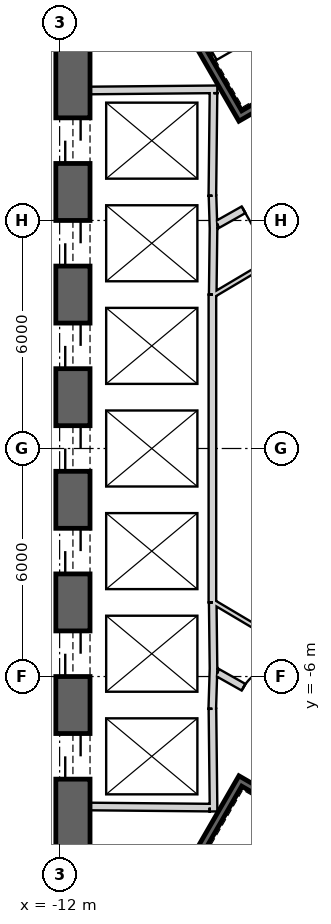
"""IFC4 building model, lengths in metres.
Left out: names, types, materials, properties, quantities, classifications, styles, units other than length and angle.
Written with IfcOpenShell. Run it as: python <this file> out.ifc"""

import sys

from ifc_helpers import new_model, si_unit, direction, frame, frame_2d, origin, place, context, subcontext, project, spatial, rectangle, extrude, element, fill, save


model = new_model("IFC4")
c1 = context("Model", 3, precision=1e-05, world=origin(), true_north=direction((0.0, 1.0)))
c2 = subcontext(c1, "Body", "Model", "MODEL_VIEW")
j1 = project(units=[si_unit("LENGTHUNIT", "METRE"), si_unit("PLANEANGLEUNIT", "RADIAN")], contexts=[c1])
p1 = place(None, origin())
s1 = spatial("IfcSite", under=j1, at=p1, CompositionType="ELEMENT")
p2 = place(p1, origin())
s2 = spatial("IfcBuilding", under=s1, at=p2, CompositionType="ELEMENT")
p3 = place(p2, frame((0.0, 0.0, 253.2)))
s3 = spatial("IfcBuildingStorey", under=s2, at=p3, CompositionType="ELEMENT", Elevation=253.2)
p4 = place(p3, frame((19.475, 2.208, 0.0), z_axis=(0.0, 0.0, 1.0), x_axis=(-0.866028369851, 0.499994862586, 0.0)))
e1 = element("IfcWall", 1, at=p4, inside=s3, PredefinedType="SHEAR", context=c2, shape_type="SweptSolid", body=[
    extrude(rectangle(XDim=31.523, YDim=0.9, at=frame_2d((15.762, 0.0))), origin(), (0.0, 0.0, 1.0), 4.0),
])
p5 = place(p4, frame((7.062, 0.0, 0.0)))
e2 = element("IfcOpeningElement", 2, at=p5, cuts=e1, PredefinedType="OPENING", context=c2, shape_type="SweptSolid", body=[
    extrude(rectangle(XDim=1.2, YDim=2.4, at=frame_2d((0.6, 1.2))), frame((0.0, 0.46, 0.0), z_axis=(0.0, -1.0, 0.0), x_axis=(1.0, 0.0, 0.0)), (0.0, 0.0, 1.0), 0.92),
])
p6 = place(p4, frame((3.612, 0.0, 0.0)))
e3 = element("IfcOpeningElement", 3, at=p6, cuts=e1, PredefinedType="OPENING", context=c2, shape_type="SweptSolid", body=[
    extrude(rectangle(XDim=1.2, YDim=2.4, at=frame_2d((0.6, 1.2))), frame((0.0, 0.46, 0.0), z_axis=(0.0, -1.0, 0.0), x_axis=(1.0, 0.0, 0.0)), (0.0, 0.0, 1.0), 0.92),
])
p7 = place(p4, frame((26.712, 0.0, 0.0)))
e4 = element("IfcOpeningElement", 4, at=p7, cuts=e1, PredefinedType="OPENING", context=c2, shape_type="SweptSolid", body=[
    extrude(rectangle(XDim=1.2, YDim=2.4, at=frame_2d((0.6, 1.2))), frame((0.0, 0.46, 0.0), z_axis=(0.0, -1.0, 0.0), x_axis=(1.0, 0.0, 0.0)), (0.0, 0.0, 1.0), 0.92),
])
p8 = place(p3, frame((-11.65, 15.762, 0.0), z_axis=(0.0, 0.0, 1.0), x_axis=(0.0, -1.0, 0.0)))
e5 = element("IfcWall", 5, at=p8, inside=s3, PredefinedType="SHEAR", context=c2, shape_type="SweptSolid", body=[
    extrude(rectangle(XDim=31.523, YDim=0.9, at=frame_2d((15.762, 0.0))), origin(), (0.0, 0.0, 1.0), 4.0),
])
p9 = place(p8, frame((7.062, 0.0, 0.0)))
e6 = element("IfcOpeningElement", 6, at=p9, cuts=e5, PredefinedType="OPENING", context=c2, shape_type="SweptSolid", body=[
    extrude(rectangle(XDim=1.2, YDim=2.4, at=frame_2d((0.6, 1.2))), frame((0.0, 0.46, 0.0), z_axis=(0.0, -1.0, 0.0), x_axis=(1.0, 0.0, 0.0)), (0.0, 0.0, 1.0), 0.92),
])
p10 = place(p8, frame((9.762, 0.0, 0.0)))
e7 = element("IfcOpeningElement", 7, at=p10, cuts=e5, PredefinedType="OPENING", context=c2, shape_type="SweptSolid", body=[
    extrude(rectangle(XDim=1.2, YDim=2.4, at=frame_2d((0.6, 1.2))), frame((0.0, 0.46, 0.0), z_axis=(0.0, -1.0, 0.0), x_axis=(1.0, 0.0, 0.0)), (0.0, 0.0, 1.0), 0.92),
])
p11 = place(p8, frame((12.462, 0.0, 0.0)))
e8 = element("IfcOpeningElement", 8, at=p11, cuts=e5, PredefinedType="OPENING", context=c2, shape_type="SweptSolid", body=[
    extrude(rectangle(XDim=1.2, YDim=2.4, at=frame_2d((0.6, 1.2))), frame((0.0, 0.46, 0.0), z_axis=(0.0, -1.0, 0.0), x_axis=(1.0, 0.0, 0.0)), (0.0, 0.0, 1.0), 0.92),
])
p12 = place(p8, frame((15.162, 0.0, 0.0)))
e9 = element("IfcOpeningElement", 9, at=p12, cuts=e5, PredefinedType="OPENING", context=c2, shape_type="SweptSolid", body=[
    extrude(rectangle(XDim=1.2, YDim=2.4, at=frame_2d((0.6, 1.2))), frame((0.0, 0.46, 0.0), z_axis=(0.0, -1.0, 0.0), x_axis=(1.0, 0.0, 0.0)), (0.0, 0.0, 1.0), 0.92),
])
p13 = place(p8, frame((17.862, 0.0, 0.0)))
e10 = element("IfcOpeningElement", 10, at=p13, cuts=e5, PredefinedType="OPENING", context=c2, shape_type="SweptSolid", body=[
    extrude(rectangle(XDim=1.2, YDim=2.4, at=frame_2d((0.6, 1.2))), frame((0.0, 0.46, 0.0), z_axis=(0.0, -1.0, 0.0), x_axis=(1.0, 0.0, 0.0)), (0.0, 0.0, 1.0), 0.92),
])
p14 = place(p8, frame((20.562, 0.0, 0.0)))
e11 = element("IfcOpeningElement", 11, at=p14, cuts=e5, PredefinedType="OPENING", context=c2, shape_type="SweptSolid", body=[
    extrude(rectangle(XDim=1.2, YDim=2.4, at=frame_2d((0.6, 1.2))), frame((0.0, 0.46, 0.0), z_axis=(0.0, -1.0, 0.0), x_axis=(1.0, 0.0, 0.0)), (0.0, 0.0, 1.0), 0.92),
])
p15 = place(p8, frame((23.262, 0.0, 0.0)))
e12 = element("IfcOpeningElement", 12, at=p15, cuts=e5, PredefinedType="OPENING", context=c2, shape_type="SweptSolid", body=[
    extrude(rectangle(XDim=1.2, YDim=2.4, at=frame_2d((0.6, 1.2))), frame((0.0, 0.46, 0.0), z_axis=(0.0, -1.0, 0.0), x_axis=(1.0, 0.0, 0.0)), (0.0, 0.0, 1.0), 0.92),
])
p16 = place(p8, frame((3.612, 0.0, 0.0)))
e13 = element("IfcOpeningElement", 13, at=p16, cuts=e5, PredefinedType="OPENING", context=c2, shape_type="SweptSolid", body=[
    extrude(rectangle(XDim=1.2, YDim=2.4, at=frame_2d((0.6, 1.2))), frame((0.0, 0.46, 0.0), z_axis=(0.0, -1.0, 0.0), x_axis=(1.0, 0.0, 0.0)), (0.0, 0.0, 1.0), 0.92),
])
p17 = place(p8, frame((26.712, 0.0, 0.0)))
e14 = element("IfcOpeningElement", 14, at=p17, cuts=e5, PredefinedType="OPENING", context=c2, shape_type="SweptSolid", body=[
    extrude(rectangle(XDim=1.2, YDim=2.4, at=frame_2d((0.6, 1.2))), frame((0.0, 0.46, 0.0), z_axis=(0.0, -1.0, 0.0), x_axis=(1.0, 0.0, 0.0)), (0.0, 0.0, 1.0), 0.92),
])
p18 = place(p3, frame((-7.825, -17.97, 0.0), z_axis=(0.0, 0.0, 1.0), x_axis=(0.866028369851, 0.499994862586, 0.0)))
e15 = element("IfcWall", 15, at=p18, inside=s3, PredefinedType="SHEAR", context=c2, shape_type="SweptSolid", body=[
    extrude(rectangle(XDim=31.523, YDim=0.9, at=frame_2d((15.762, 0.0))), origin(), (0.0, 0.0, 1.0), 4.0),
])
p19 = place(p18, frame((7.062, 0.0, 0.0)))
e16 = element("IfcOpeningElement", 16, at=p19, cuts=e15, PredefinedType="OPENING", context=c2, shape_type="SweptSolid", body=[
    extrude(rectangle(XDim=1.2, YDim=2.4, at=frame_2d((0.6, 1.2))), frame((0.0, 0.46, 0.0), z_axis=(0.0, -1.0, 0.0), x_axis=(1.0, 0.0, 0.0)), (0.0, 0.0, 1.0), 0.92),
])
p20 = place(p18, frame((9.762, 0.0, 0.0)))
e17 = element("IfcOpeningElement", 17, at=p20, cuts=e15, PredefinedType="OPENING", context=c2, shape_type="SweptSolid", body=[
    extrude(rectangle(XDim=1.2, YDim=2.4, at=frame_2d((0.6, 1.2))), frame((0.0, 0.46, 0.0), z_axis=(0.0, -1.0, 0.0), x_axis=(1.0, 0.0, 0.0)), (0.0, 0.0, 1.0), 0.92),
])
p21 = place(p18, frame((12.462, 0.0, 0.0)))
e18 = element("IfcOpeningElement", 18, at=p21, cuts=e15, PredefinedType="OPENING", context=c2, shape_type="SweptSolid", body=[
    extrude(rectangle(XDim=1.2, YDim=2.4, at=frame_2d((0.6, 1.2))), frame((0.0, 0.46, 0.0), z_axis=(0.0, -1.0, 0.0), x_axis=(1.0, 0.0, 0.0)), (0.0, 0.0, 1.0), 0.92),
])
p22 = place(p18, frame((15.162, 0.0, 0.0)))
e19 = element("IfcOpeningElement", 19, at=p22, cuts=e15, PredefinedType="OPENING", context=c2, shape_type="SweptSolid", body=[
    extrude(rectangle(XDim=1.2, YDim=2.4, at=frame_2d((0.6, 1.2))), frame((0.0, 0.46, 0.0), z_axis=(0.0, -1.0, 0.0), x_axis=(1.0, 0.0, 0.0)), (0.0, 0.0, 1.0), 0.92),
])
p23 = place(p18, frame((17.862, 0.0, 0.0)))
e20 = element("IfcOpeningElement", 20, at=p23, cuts=e15, PredefinedType="OPENING", context=c2, shape_type="SweptSolid", body=[
    extrude(rectangle(XDim=1.2, YDim=2.4, at=frame_2d((0.6, 1.2))), frame((0.0, 0.46, 0.0), z_axis=(0.0, -1.0, 0.0), x_axis=(1.0, 0.0, 0.0)), (0.0, 0.0, 1.0), 0.92),
])
p24 = place(p18, frame((20.562, 0.0, 0.0)))
e21 = element("IfcOpeningElement", 21, at=p24, cuts=e15, PredefinedType="OPENING", context=c2, shape_type="SweptSolid", body=[
    extrude(rectangle(XDim=1.2, YDim=2.4, at=frame_2d((0.6, 1.2))), frame((0.0, 0.46, 0.0), z_axis=(0.0, -1.0, 0.0), x_axis=(1.0, 0.0, 0.0)), (0.0, 0.0, 1.0), 0.92),
])
p25 = place(p18, frame((26.712, 0.0, 0.0)))
e22 = element("IfcOpeningElement", 22, at=p25, cuts=e15, PredefinedType="OPENING", context=c2, shape_type="SweptSolid", body=[
    extrude(rectangle(XDim=1.2, YDim=2.4, at=frame_2d((0.6, 1.2))), frame((0.0, 0.46, 0.0), z_axis=(0.0, -1.0, 0.0), x_axis=(1.0, 0.0, 0.0)), (0.0, 0.0, 1.0), 0.92),
])
p26 = place(p18, frame((3.612, 0.0, 0.0)))
e23 = element("IfcOpeningElement", 23, at=p26, cuts=e15, PredefinedType="OPENING", context=c2, shape_type="SweptSolid", body=[
    extrude(rectangle(XDim=1.2, YDim=2.4, at=frame_2d((0.6, 1.2))), frame((0.0, 0.46, 0.0), z_axis=(0.0, -1.0, 0.0), x_axis=(1.0, 0.0, 0.0)), (0.0, 0.0, 1.0), 0.92),
])
p27 = place(p3, frame((-11.2, 9.42, 0.0), z_axis=(0.0, 0.0, 1.0), x_axis=(0.999957167047, 0.009255488683, 0.0)))
e24 = element("IfcWall", 24, at=p27, inside=s3, PredefinedType="PLUMBINGWALL", context=c2, shape_type="SweptSolid", body=[
    extrude(rectangle(XDim=3.35, YDim=0.2, at=frame_2d((1.675, 0.0))), origin(), (0.0, 0.0, 1.0), 3.7),
])
p28 = place(p3, frame((-7.951, 9.35, 0.0), z_axis=(0.0, 0.0, 1.0), x_axis=(-0.011120469654, -0.999938165666, 0.0)))
e25 = element("IfcWall", 25, at=p28, inside=s3, PredefinedType="PLUMBINGWALL", context=c2, shape_type="SweptSolid", body=[
    extrude(rectangle(XDim=2.7, YDim=0.2, at=frame_2d((1.35, 0.0))), origin(), (0.0, 0.0, 1.0), 3.7),
])
p29 = place(p3, frame((-7.977, 6.65, 0.0), z_axis=(0.0, 0.0, 1.0), x_axis=(0.030861509705, -0.999523670164, 0.0)))
e26 = element("IfcWall", 26, at=p29, inside=s3, PredefinedType="PLUMBINGWALL", context=c2, shape_type="SweptSolid", body=[
    extrude(rectangle(XDim=0.878, YDim=0.2, at=frame_2d((0.439, 0.0))), origin(), (0.0, 0.0, 1.0), 3.7),
])
p30 = place(p3, frame((-7.949, 5.895, 0.0), z_axis=(0.0, 0.0, 1.0), x_axis=(-0.012042535896, -0.999927486035, 0.0)))
e27 = element("IfcWall", 27, at=p30, inside=s3, PredefinedType="PLUMBINGWALL", context=c2, shape_type="SweptSolid", body=[
    extrude(rectangle(XDim=1.845, YDim=0.2, at=frame_2d((0.922, 0.0))), origin(), (0.0, 0.0, 1.0), 3.7),
])
p31 = place(p3, frame((-7.98, 4.05, 0.0), z_axis=(0.0, 0.0, 1.0), x_axis=(0.0, -1.0, 0.0)))
e28 = element("IfcWall", 28, at=p31, inside=s3, PredefinedType="PLUMBINGWALL", context=c2, shape_type="SweptSolid", body=[
    extrude(rectangle(XDim=8.1, YDim=0.2, at=frame_2d((4.05, 0.0))), origin(), (0.0, 0.0, 1.0), 3.7),
])
p32 = place(p3, frame((-7.95, -5.772, 0.0), z_axis=(0.0, 0.0, 1.0), x_axis=(-0.030803413295, -0.999525462272, 0.0)))
e29 = element("IfcWall", 29, at=p32, inside=s3, PredefinedType="PLUMBINGWALL", context=c2, shape_type="SweptSolid", body=[
    extrude(rectangle(XDim=1.078, YDim=0.2, at=frame_2d((0.539, 0.0))), origin(), (0.0, 0.0, 1.0), 3.7),
])
p33 = place(p3, frame((-7.971, -4.05, 0.0), z_axis=(0.0, 0.0, 1.0), x_axis=(0.012042535896, -0.999927486035, 0.0)))
e30 = element("IfcWall", 30, at=p33, inside=s3, PredefinedType="PLUMBINGWALL", context=c2, shape_type="SweptSolid", body=[
    extrude(rectangle(XDim=1.845, YDim=0.2, at=frame_2d((0.922, 0.0))), origin(), (0.0, 0.0, 1.0), 3.7),
])
p34 = place(p3, frame((-7.979, -6.85, 0.0), z_axis=(0.0, 0.0, 1.0), x_axis=(0.011121475088, -0.999938154483, 0.0)))
e31 = element("IfcWall", 31, at=p34, inside=s3, PredefinedType="PLUMBINGWALL", context=c2, shape_type="SweptSolid", body=[
    extrude(rectangle(XDim=2.7, YDim=0.2, at=frame_2d((1.35, 0.0))), origin(), (0.0, 0.0, 1.0), 3.7),
])
p35 = place(p3, frame((-8.05, -9.449, 0.0), z_axis=(0.0, 0.0, 1.0), x_axis=(-0.999957467379, 0.009222983926, 0.0)))
e32 = element("IfcWall", 32, at=p35, inside=s3, PredefinedType="PLUMBINGWALL", context=c2, shape_type="SweptSolid", body=[
    extrude(rectangle(XDim=3.15, YDim=0.2, at=frame_2d((1.575, 0.0))), origin(), (0.0, 0.0, 1.0), 3.7),
])
p36 = place(p3, frame((-11.245, 15.678, -0.3), z_axis=(0.0, 0.0, 1.0), x_axis=(0.499977274689, -0.866038523851, 0.0)))
e33 = element("IfcWall", 33, at=p36, inside=s3, PredefinedType="SHEAR", context=c2, shape_type="SweptSolid", body=[
    extrude(rectangle(XDim=8.1, YDim=0.2, at=frame_2d((4.05, 0.0))), origin(), (0.0, 0.0, 1.0), 4.0),
])
p37 = place(p3, frame((-7.159, 8.8, -0.3), z_axis=(0.0, 0.0, 1.0), x_axis=(0.866047807691, 0.499961193289, 0.0)))
e34 = element("IfcWall", 34, at=p37, inside=s3, PredefinedType="SHEAR", context=c2, shape_type="SweptSolid", body=[
    extrude(rectangle(XDim=3.6, YDim=0.2, at=frame_2d((1.8, 0.0))), origin(), (0.0, 0.0, 1.0), 4.0),
])
p38 = place(p37, frame((1.25, 0.0, 0.3)))
e35 = element("IfcOpeningElement", 35, at=p38, cuts=e34, PredefinedType="OPENING", context=c2, shape_type="SweptSolid", body=[
    extrude(rectangle(XDim=1.1, YDim=2.1, at=frame_2d((0.55, 1.05))), frame((0.0, 0.11, 0.0), z_axis=(0.0, -1.0, 0.0), x_axis=(1.0, 0.0, 0.0)), (0.0, 0.0, 1.0), 0.22),
])
p39 = place(p3, frame((-7.196, -8.663, -0.3), z_axis=(0.0, 0.0, 1.0), x_axis=(-0.499997992926, -0.866026562566, 0.0)))
e36 = element("IfcWall", 36, at=p39, inside=s3, PredefinedType="SHEAR", context=c2, shape_type="SweptSolid", body=[
    extrude(rectangle(XDim=7.9, YDim=0.2, at=frame_2d((3.95, 0.0))), origin(), (0.0, 0.0, 1.0), 4.0),
])
p40 = place(p3, frame((-4.041, -10.599, -0.3), z_axis=(0.0, 0.0, 1.0), x_axis=(-0.866047807691, 0.499961193289, 0.0)))
e37 = element("IfcWall", 37, at=p40, inside=s3, PredefinedType="SHEAR", context=c2, shape_type="SweptSolid", body=[
    extrude(rectangle(XDim=3.6, YDim=0.2, at=frame_2d((1.8, 0.0))), origin(), (0.0, 0.0, 1.0), 4.0),
])
p41 = place(p40, frame((1.25, 0.0, 0.3)))
e38 = element("IfcOpeningElement", 38, at=p41, cuts=e37, PredefinedType="OPENING", context=c2, shape_type="SweptSolid", body=[
    extrude(rectangle(XDim=1.1, YDim=2.1, at=frame_2d((0.55, 1.05))), frame((0.0, 0.11, 0.0), z_axis=(0.0, -1.0, 0.0), x_axis=(1.0, 0.0, 0.0)), (0.0, 0.0, 1.0), 0.22),
])
p42 = place(p3, frame((-5.6, 7.16, 0.0), z_axis=(0.0, 0.0, 1.0), x_axis=(-0.871363259478, -0.490638431059, 0.0)))
e39 = element("IfcWall", 39, at=p42, inside=s3, PredefinedType="PARTITIONING", context=c2, shape_type="SweptSolid", body=[
    extrude(rectangle(XDim=2.581, YDim=0.2, at=frame_2d((1.291, 0.0))), origin(), (0.0, 0.0, 1.0), 3.7),
])
p43 = place(p42, frame((0.791, 0.0, 0.0)))
e40 = element("IfcOpeningElement", 40, at=p43, cuts=e39, PredefinedType="OPENING", context=c2, shape_type="SweptSolid", body=[
    extrude(rectangle(XDim=1.0, YDim=2.1, at=frame_2d((0.5, 1.05))), frame((0.0, 0.11, 0.0), z_axis=(0.0, -1.0, 0.0), x_axis=(1.0, 0.0, 0.0)), (0.0, 0.0, 1.0), 0.22),
])
p44 = place(p3, frame((-7.849, -5.894, 0.0), z_axis=(0.0, 0.0, 1.0), x_axis=(0.871363259478, -0.490638431059, 0.0)))
e41 = element("IfcWall", 41, at=p44, inside=s3, PredefinedType="PARTITIONING", context=c2, shape_type="SweptSolid", body=[
    extrude(rectangle(XDim=2.581, YDim=0.2, at=frame_2d((1.291, 0.0))), origin(), (0.0, 0.0, 1.0), 3.7),
])
p45 = place(p44, frame((0.791, 0.0, 0.0)))
e42 = element("IfcOpeningElement", 42, at=p45, cuts=e41, PredefinedType="OPENING", context=c2, shape_type="SweptSolid", body=[
    extrude(rectangle(XDim=1.0, YDim=2.1, at=frame_2d((0.5, 1.05))), frame((0.0, 0.11, 0.0), z_axis=(0.0, -1.0, 0.0), x_axis=(1.0, 0.0, 0.0)), (0.0, 0.0, 1.0), 0.22),
])
p46 = place(p3, frame((-6.037, 5.176, 0.0), z_axis=(0.0, 0.0, 1.0), x_axis=(-0.860106072674, -0.510115225953, 0.0)))
e43 = element("IfcWall", 43, at=p46, inside=s3, PredefinedType="PARTITIONING", context=c2, shape_type="SweptSolid", body=[
    extrude(rectangle(XDim=2.225, YDim=0.12, at=frame_2d((1.112, 0.0))), origin(), (0.0, 0.0, 1.0), 3.7),
])
p47 = place(p3, frame((-7.95, -4.041, 0.0), z_axis=(0.0, 0.0, 1.0), x_axis=(0.860112457103, -0.510104461004, 0.0)))
e44 = element("IfcWall", 44, at=p47, inside=s3, PredefinedType="PARTITIONING", context=c2, shape_type="SweptSolid", body=[
    extrude(rectangle(XDim=2.104, YDim=0.12, at=frame_2d((1.052, 0.0))), origin(), (0.0, 0.0, 1.0), 3.7),
])
p48 = place(p43, origin())
e45 = element("IfcDoor", 45, at=p48, inside=s3, OperationType="SINGLE_SWING_RIGHT", PredefinedType="USERDEFINED", context=c2, shape_type="SweptSolid", body=[
    extrude(rectangle(XDim=1.0, YDim=2.1, at=frame_2d((0.5, 1.05))), frame((0.0, 0.025, 0.0), z_axis=(0.0, -1.0, 0.0), x_axis=(1.0, 0.0, 0.0)), (0.0, 0.0, 1.0), 0.05),
])
fill(e40, e45)
p49 = place(p45, origin())
e46 = element("IfcDoor", 46, at=p49, inside=s3, OperationType="SINGLE_SWING_RIGHT", PredefinedType="USERDEFINED", context=c2, shape_type="SweptSolid", body=[
    extrude(rectangle(XDim=1.0, YDim=2.1, at=frame_2d((0.5, 1.05))), frame((0.0, 0.025, 0.0), z_axis=(0.0, -1.0, 0.0), x_axis=(1.0, 0.0, 0.0)), (0.0, 0.0, 1.0), 0.05),
])
fill(e42, e46)
p50 = place(p9, origin())
e47 = element("IfcDoor", 47, at=p50, inside=s3, OperationType="SLIDING_TO_LEFT", PredefinedType="USERDEFINED", context=c2, shape_type="SweptSolid", body=[
    extrude(rectangle(XDim=1.2, YDim=2.4, at=frame_2d((0.6, 1.2))), frame((0.0, 0.025, 0.0), z_axis=(0.0, -1.0, 0.0), x_axis=(1.0, 0.0, 0.0)), (0.0, 0.0, 1.0), 0.05),
])
fill(e6, e47)
p51 = place(p10, origin())
e48 = element("IfcDoor", 48, at=p51, inside=s3, OperationType="SLIDING_TO_LEFT", PredefinedType="USERDEFINED", context=c2, shape_type="SweptSolid", body=[
    extrude(rectangle(XDim=1.2, YDim=2.4, at=frame_2d((0.6, 1.2))), frame((0.0, 0.025, 0.0), z_axis=(0.0, -1.0, 0.0), x_axis=(1.0, 0.0, 0.0)), (0.0, 0.0, 1.0), 0.05),
])
fill(e7, e48)
p52 = place(p11, origin())
e49 = element("IfcDoor", 49, at=p52, inside=s3, OperationType="SLIDING_TO_LEFT", PredefinedType="USERDEFINED", context=c2, shape_type="SweptSolid", body=[
    extrude(rectangle(XDim=1.2, YDim=2.4, at=frame_2d((0.6, 1.2))), frame((0.0, 0.025, 0.0), z_axis=(0.0, -1.0, 0.0), x_axis=(1.0, 0.0, 0.0)), (0.0, 0.0, 1.0), 0.05),
])
fill(e8, e49)
p53 = place(p12, origin())
e50 = element("IfcDoor", 50, at=p53, inside=s3, OperationType="SLIDING_TO_LEFT", PredefinedType="USERDEFINED", context=c2, shape_type="SweptSolid", body=[
    extrude(rectangle(XDim=1.2, YDim=2.4, at=frame_2d((0.6, 1.2))), frame((0.0, 0.025, 0.0), z_axis=(0.0, -1.0, 0.0), x_axis=(1.0, 0.0, 0.0)), (0.0, 0.0, 1.0), 0.05),
])
fill(e9, e50)
p54 = place(p13, origin())
e51 = element("IfcDoor", 51, at=p54, inside=s3, OperationType="SLIDING_TO_LEFT", PredefinedType="USERDEFINED", context=c2, shape_type="SweptSolid", body=[
    extrude(rectangle(XDim=1.2, YDim=2.4, at=frame_2d((0.6, 1.2))), frame((0.0, 0.025, 0.0), z_axis=(0.0, -1.0, 0.0), x_axis=(1.0, 0.0, 0.0)), (0.0, 0.0, 1.0), 0.05),
])
fill(e10, e51)
p55 = place(p14, origin())
e52 = element("IfcDoor", 52, at=p55, inside=s3, OperationType="SLIDING_TO_LEFT", PredefinedType="USERDEFINED", context=c2, shape_type="SweptSolid", body=[
    extrude(rectangle(XDim=1.2, YDim=2.4, at=frame_2d((0.6, 1.2))), frame((0.0, 0.025, 0.0), z_axis=(0.0, -1.0, 0.0), x_axis=(1.0, 0.0, 0.0)), (0.0, 0.0, 1.0), 0.05),
])
fill(e11, e52)
p56 = place(p15, origin())
e53 = element("IfcDoor", 53, at=p56, inside=s3, OperationType="SLIDING_TO_LEFT", PredefinedType="USERDEFINED", context=c2, shape_type="SweptSolid", body=[
    extrude(rectangle(XDim=1.2, YDim=2.4, at=frame_2d((0.6, 1.2))), frame((0.0, 0.025, 0.0), z_axis=(0.0, -1.0, 0.0), x_axis=(1.0, 0.0, 0.0)), (0.0, 0.0, 1.0), 0.05),
])
fill(e12, e53)
save(model, sys.argv[1])
